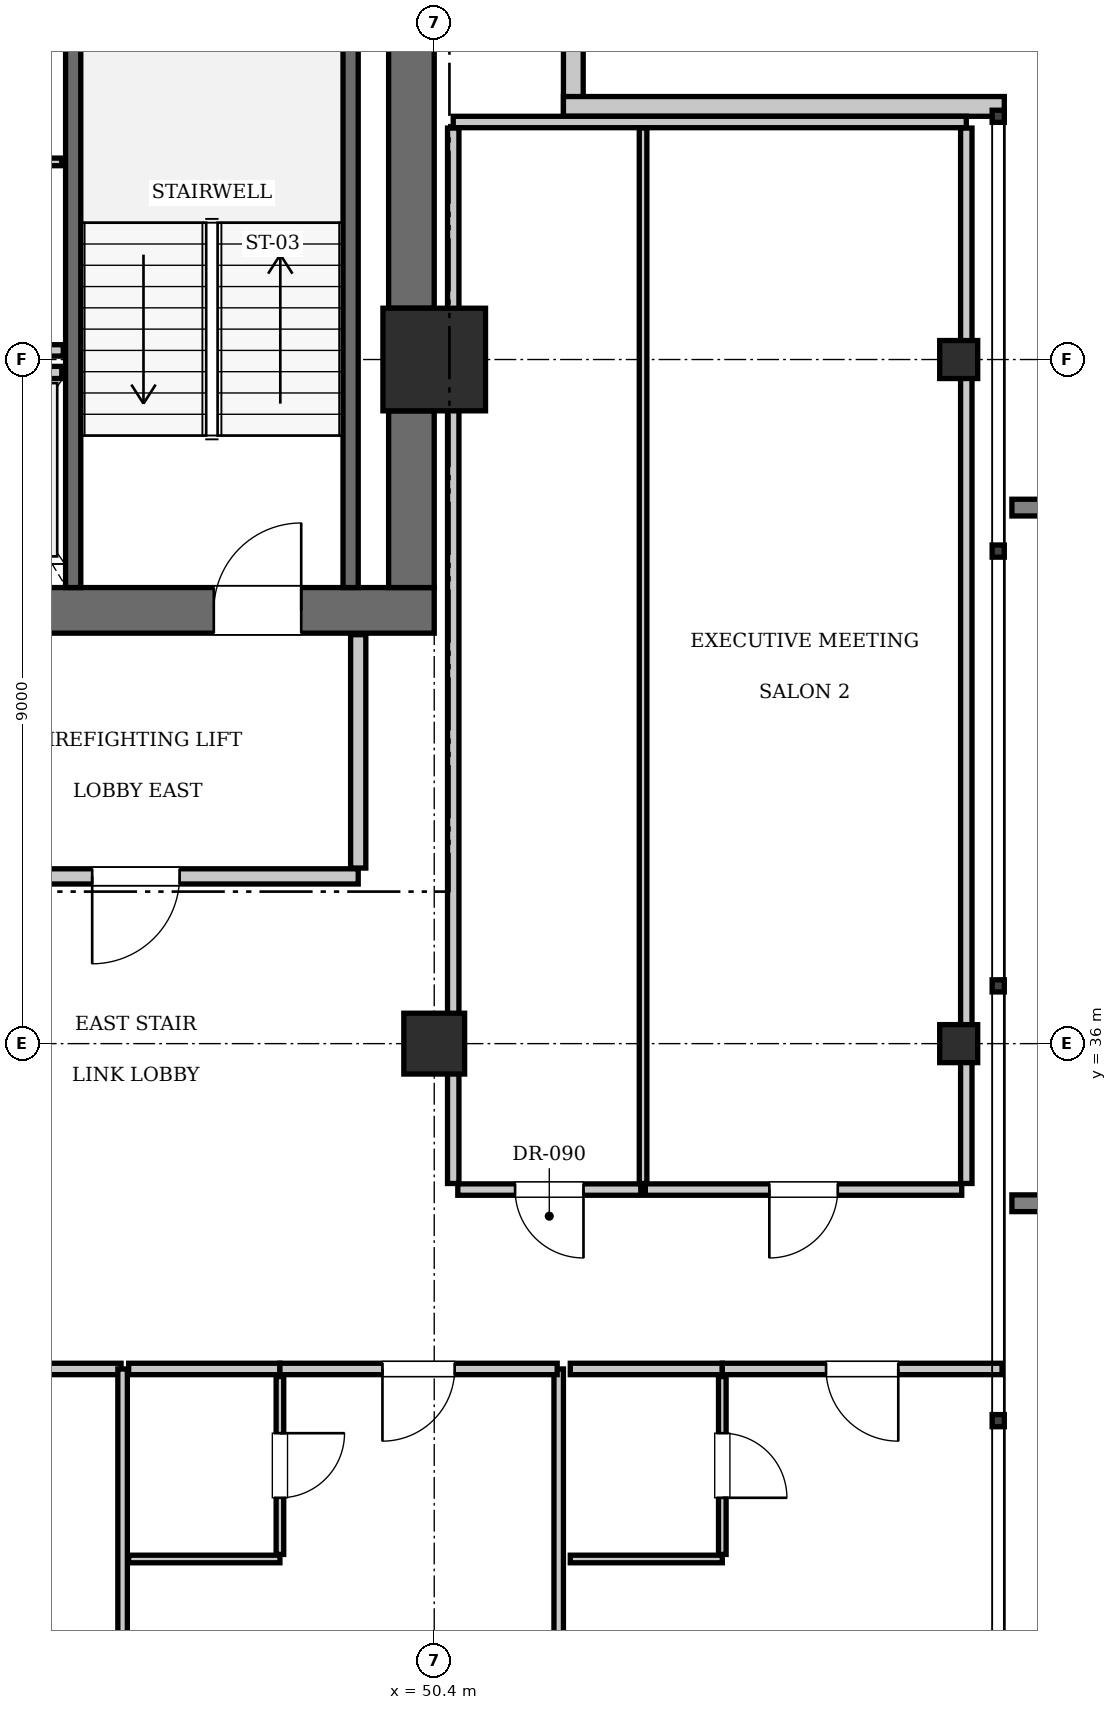
"""IFC4 building model, lengths in metres.
Left out: names, types, materials, properties, quantities, classifications, styles, units other than length and angle.
Written with IfcOpenShell. Run it as: python <this file> out.ifc"""

import sys

from ifc_helpers import new_model, si_unit, direction, frame, frame_2d, origin, origin_2d, place, context, subcontext, project, spatial, rectangle, i_section, extrude, element, fill, save


model = new_model("IFC4")
c1 = context("Model", 3, precision=1e-05, world=origin(), true_north=direction((0.0, 1.0)))
c2 = subcontext(c1, "Body", "Model", "MODEL_VIEW")
j1 = project(units=[si_unit("LENGTHUNIT", "METRE"), si_unit("PLANEANGLEUNIT", "RADIAN")], contexts=[c1])
p1 = place(None, origin())
s1 = spatial("IfcSite", under=j1, at=p1, CompositionType="ELEMENT")
p2 = place(p1, origin())
s2 = spatial("IfcBuilding", under=s1, at=p2, CompositionType="ELEMENT")
p3 = place(p2, frame((0.0, 0.0, 325.85)))
s3 = spatial("IfcBuildingStorey", under=s2, at=p3, CompositionType="ELEMENT", Elevation=325.85)
p4 = place(p3, frame((50.4, 45.0, 0.0), z_axis=(0.0, 0.0, 1.0), x_axis=(1.0, 0.0, 0.0)))
e1 = element("IfcColumn", 1, at=p4, inside=s3, PredefinedType="COLUMN", context=c2, shape_type="SweptSolid", body=[
    extrude(rectangle(XDim=1.35, YDim=1.35, at=origin_2d()), origin(), (0.0, 0.0, 1.0), 3.85),
])
p5 = place(p3, frame((43.6, 41.7, 0.0), z_axis=(0.0, 0.0, 1.0), x_axis=(1.0, 0.0, 0.0)))
e2 = element("IfcWall", 2, at=p5, inside=s3, PredefinedType="SHEAR", context=c2, shape_type="SweptSolid", body=[
    extrude(rectangle(XDim=6.8, YDim=0.6, at=frame_2d((3.4, 0.0))), origin(), (0.0, 0.0, 1.0), 3.85),
])
p6 = place(p5, frame((3.9, 0.0, 0.0)))
e3 = element("IfcOpeningElement", 3, at=p6, cuts=e2, PredefinedType="OPENING", context=c2, shape_type="SweptSolid", body=[
    extrude(rectangle(XDim=1.15, YDim=2.15, at=frame_2d((0.575, 1.075))), frame((0.0, 0.31, 0.0), z_axis=(0.0, -1.0, 0.0), x_axis=(1.0, 0.0, 0.0)), (0.0, 0.0, 1.0), 0.62),
])
p7 = place(p5, frame((0.55, 0.0, 0.0)))
e4 = element("IfcOpeningElement", 4, at=p7, cuts=e2, PredefinedType="OPENING", context=c2, shape_type="SweptSolid", body=[
    extrude(rectangle(XDim=1.1, YDim=2.2, at=frame_2d((0.55, 1.1))), frame((0.0, 0.31, 0.0), z_axis=(0.0, -1.0, 0.0), x_axis=(1.0, 0.0, 0.0)), (0.0, 0.0, 1.0), 0.62),
])
p8 = place(p3, frame((50.1, 42.0, 0.0), z_axis=(0.0, 0.0, 1.0), x_axis=(0.0, 1.0, 0.0)))
e5 = element("IfcWall", 5, at=p8, inside=s3, PredefinedType="SHEAR", context=c2, shape_type="SweptSolid", body=[
    extrude(rectangle(XDim=2.325, YDim=0.6, at=frame_2d((1.163, 0.0))), origin(), (0.0, 0.0, 1.0), 3.85),
])
p9 = place(p3, frame((50.1, 45.675, 0.0), z_axis=(0.0, 0.0, 1.0), x_axis=(0.0, 1.0, 0.0)))
e6 = element("IfcWall", 6, at=p9, inside=s3, PredefinedType="SHEAR", context=c2, shape_type="SweptSolid", body=[
    extrude(rectangle(XDim=7.725, YDim=0.6, at=frame_2d((3.862, 0.0))), origin(), (0.0, 0.0, 1.0), 3.85),
])
p10 = place(p3, frame((50.4, 36.0, 0.0), z_axis=(0.0, 0.0, 1.0), x_axis=(1.0, 0.0, 0.0)))
e7 = element("IfcColumn", 7, at=p10, inside=s3, PredefinedType="COLUMN", context=c2, shape_type="SweptSolid", body=[
    extrude(rectangle(XDim=0.8, YDim=0.8, at=origin_2d()), origin(), (0.0, 0.0, 1.0), 3.85),
])
for number, where, z_axis, x_axis in (
    (8, (57.3, 36.0, 0.0), (0.0, 0.0, 1.0), (1.0, 0.0, 0.0)),
    (9, (57.3, 45.0, 0.0), (0.0, 0.0, 1.0), (1.0, 0.0, 0.0)),
):
    element("IfcColumn", number, at=place(p3, frame(where, z_axis=z_axis, x_axis=x_axis)), inside=s3, PredefinedType="COLUMN", context=c2, shape_type="SweptSolid", body=[
        extrude(i_section(OverallWidth=0.5, OverallDepth=0.5, WebThickness=0.022, FlangeThickness=0.032, at=origin_2d()), origin(), (0.0, 0.0, 1.0), 3.85),
    ])
p11 = place(p3, frame((45.65, 42.0, 0.0), z_axis=(0.0, 0.0, 1.0), x_axis=(0.0, 1.0, 0.0)))
e10 = element("IfcWall", 10, at=p11, inside=s3, PredefinedType="SOLIDWALL", context=c2, shape_type="SweptSolid", body=[
    extrude(rectangle(XDim=9.15, YDim=0.2, at=frame_2d((4.575, 0.0))), origin(), (0.0, 0.0, 1.0), 3.61),
])
p12 = place(p3, frame((49.3, 42.0, 0.0), z_axis=(0.0, 0.0, 1.0), x_axis=(0.0, 1.0, 0.0)))
e11 = element("IfcWall", 11, at=p12, inside=s3, PredefinedType="SOLIDWALL", context=c2, shape_type="SweptSolid", body=[
    extrude(rectangle(XDim=9.12, YDim=0.2, at=frame_2d((4.56, 0.0))), origin(), (0.0, 0.0, 1.0), 3.61),
])
p13 = place(p3, frame((43.9, 44.83, 0.0), z_axis=(0.0, 0.0, 1.0), x_axis=(1.0, 0.0, 0.0)))
e12 = element("IfcWall", 12, at=p13, inside=s3, PredefinedType="SOLIDWALL", context=c2, shape_type="SweptSolid", body=[
    extrude(rectangle(XDim=1.6, YDim=0.16, at=frame_2d((0.8, 0.0))), origin(), (0.0, 0.0, 1.0), 3.61),
])
p14 = place(p3, frame((52.23, 54.0, 0.0), z_axis=(0.0, 0.0, 1.0), x_axis=(0.0, -1.0, 0.0)))
e13 = element("IfcWall", 13, at=p14, inside=s3, PredefinedType="SOLIDWALL", context=c2, shape_type="SweptSolid", body=[
    extrude(rectangle(XDim=5.8, YDim=0.26, at=frame_2d((2.9, 0.0))), origin(), (0.0, 0.0, 1.0), 3.61),
])
p15 = place(p3, frame((52.1, 48.33, 0.0), z_axis=(0.0, 0.0, 1.0), x_axis=(1.0, 0.0, 0.0)))
e14 = element("IfcWall", 14, at=p15, inside=s3, PredefinedType="SOLIDWALL", context=c2, shape_type="SweptSolid", body=[
    extrude(rectangle(XDim=5.8, YDim=0.26, at=frame_2d((2.9, 0.0))), origin(), (0.0, 0.0, 1.0), 3.61),
])
p16 = place(p3, frame((43.6, 38.2, 0.0), z_axis=(0.0, 0.0, 1.0), x_axis=(1.0, 0.0, 0.0)))
e15 = element("IfcWall", 15, at=p16, inside=s3, PredefinedType="PARTITIONING", context=c2, shape_type="SweptSolid", body=[
    extrude(rectangle(XDim=5.8, YDim=0.2, at=frame_2d((2.9, 0.0))), origin(), (0.0, 0.0, 1.0), 3.61),
])
p17 = place(p16, frame((2.3, 0.0, 0.0)))
e16 = element("IfcOpeningElement", 16, at=p17, cuts=e15, PredefinedType="OPENING", context=c2, shape_type="SweptSolid", body=[
    extrude(rectangle(XDim=1.15, YDim=2.15, at=frame_2d((0.575, 1.075))), frame((0.0, 0.11, 0.0), z_axis=(0.0, -1.0, 0.0), x_axis=(1.0, 0.0, 0.0)), (0.0, 0.0, 1.0), 0.22),
])
p18 = place(p3, frame((49.4, 38.31, 0.0), z_axis=(0.0, 0.0, 1.0), x_axis=(0.0, 1.0, 0.0)))
e17 = element("IfcWall", 17, at=p18, inside=s3, PredefinedType="PARTITIONING", context=c2, shape_type="SweptSolid", body=[
    extrude(rectangle(XDim=3.07, YDim=0.2, at=frame_2d((1.535, 0.0))), origin(), (0.0, 0.0, 1.0), 3.61),
])
p19 = place(p3, frame((42.4, 47.6, 0.0), z_axis=(0.0, 0.0, 1.0), x_axis=(1.0, 0.0, 0.0)))
e18 = element("IfcWall", 18, at=p19, inside=s3, PredefinedType="PARTITIONING", context=c2, shape_type="SweptSolid", body=[
    extrude(rectangle(XDim=3.1, YDim=0.1, at=frame_2d((1.55, 0.0))), origin(), (0.0, 0.0, 1.0), 3.61),
])
p20 = place(p3, frame((42.38, 45.12, 0.0), z_axis=(0.0, 0.0, 1.0), x_axis=(1.0, 0.0, 0.0)))
e19 = element("IfcWall", 19, at=p20, inside=s3, PredefinedType="PARTITIONING", context=c2, shape_type="SweptSolid", body=[
    extrude(rectangle(XDim=3.14, YDim=0.15, at=frame_2d((1.57, 0.0))), origin(), (0.0, 0.0, 1.0), 3.61),
])
p21 = place(p3, frame((50.65, 48.125, 0.0), z_axis=(0.0, 0.0, 1.0), x_axis=(1.0, 0.0, 0.0)))
e20 = element("IfcWall", 20, at=p21, inside=s3, PredefinedType="PARTITIONING", context=c2, shape_type="SweptSolid", body=[
    extrude(rectangle(XDim=6.75, YDim=0.15, at=frame_2d((3.375, 0.0))), origin(), (0.0, 0.0, 1.0), 3.61),
])
p22 = place(p3, frame((50.65, 34.16, 0.0), z_axis=(0.0, 0.0, 1.0), x_axis=(0.0, 1.0, 0.0)))
e21 = element("IfcWall", 21, at=p22, inside=s3, PredefinedType="PARTITIONING", context=c2, shape_type="SweptSolid", body=[
    extrude(rectangle(XDim=13.885, YDim=0.15, at=frame_2d((6.942, 0.0))), origin(), (0.0, 0.0, 1.0), 3.61),
])
p23 = place(p3, frame((57.4, 34.16, 0.0), z_axis=(0.0, 0.0, 1.0), x_axis=(0.0, 1.0, 0.0)))
e22 = element("IfcWall", 22, at=p23, inside=s3, PredefinedType="PARTITIONING", context=c2, shape_type="SweptSolid", body=[
    extrude(rectangle(XDim=13.885, YDim=0.15, at=frame_2d((6.942, 0.0))), origin(), (0.0, 0.0, 1.0), 3.141),
])
p24 = place(p3, frame((50.71, 34.08, 0.0), z_axis=(0.0, 0.0, 1.0), x_axis=(1.0, 0.0, 0.0)))
e23 = element("IfcWall", 23, at=p24, inside=s3, PredefinedType="PARTITIONING", context=c2, shape_type="SweptSolid", body=[
    extrude(rectangle(XDim=2.407, YDim=0.15, at=frame_2d((1.204, 0.0))), origin(), (0.0, 0.0, 1.0), 3.61),
])
p25 = place(p24, frame((0.754, 0.0, 0.0)))
e24 = element("IfcOpeningElement", 24, at=p25, cuts=e23, PredefinedType="OPENING", context=c2, shape_type="SweptSolid", body=[
    extrude(rectangle(XDim=0.9, YDim=2.1, at=frame_2d((0.45, 1.05))), frame((0.0, 0.085, 0.0), z_axis=(0.0, -1.0, 0.0), x_axis=(1.0, 0.0, 0.0)), (0.0, 0.0, 1.0), 0.17),
])
p26 = place(p3, frame((53.147, 34.16, 0.0), z_axis=(0.0, 0.0, 1.0), x_axis=(0.0, 1.0, 0.0)))
e25 = element("IfcWall", 25, at=p26, inside=s3, PredefinedType="PARTITIONING", context=c2, shape_type="SweptSolid", body=[
    extrude(rectangle(XDim=13.885, YDim=0.1, at=frame_2d((6.942, 0.0))), origin(), (0.0, 0.0, 1.0), 3.61),
])
p27 = place(p3, frame((53.177, 34.08, 0.0), z_axis=(0.0, 0.0, 1.0), x_axis=(1.0, 0.0, 0.0)))
e26 = element("IfcWall", 26, at=p27, inside=s3, PredefinedType="PARTITIONING", context=c2, shape_type="SweptSolid", body=[
    extrude(rectangle(XDim=4.163, YDim=0.15, at=frame_2d((2.081, 0.0))), origin(), (0.0, 0.0, 1.0), 3.61),
])
p28 = place(p27, frame((1.631, 0.0, 0.0)))
e27 = element("IfcOpeningElement", 27, at=p28, cuts=e26, PredefinedType="OPENING", context=c2, shape_type="SweptSolid", body=[
    extrude(rectangle(XDim=0.9, YDim=2.1, at=frame_2d((0.45, 1.05))), frame((0.0, 0.085, 0.0), z_axis=(0.0, -1.0, 0.0), x_axis=(1.0, 0.0, 0.0)), (0.0, 0.0, 1.0), 0.17),
])
p29 = place(p3, frame((52.038, 19.34, 0.0), z_axis=(0.0, 0.0, 1.0), x_axis=(0.0, 1.0, 0.0)))
e28 = element("IfcWall", 28, at=p29, inside=s3, PredefinedType="PARTITIONING", context=c2, shape_type="SweptSolid", body=[
    extrude(rectangle(XDim=12.38, YDim=0.125, at=frame_2d((6.19, 0.0))), origin(), (0.0, 0.0, 1.0), 3.61),
])
p30 = place(p3, frame((42.65, 31.72, 0.0), z_axis=(0.0, 0.0, 1.0), x_axis=(1.0, 0.0, 0.0)))
e29 = element("IfcWall", 29, at=p30, inside=s3, PredefinedType="PARTITIONING", context=c2, shape_type="SweptSolid", body=[
    extrude(rectangle(XDim=3.63, YDim=0.15, at=frame_2d((1.815, 0.0))), origin(), (0.0, 0.0, 1.0), 3.61),
])
p31 = place(p30, frame((1.34, 0.0, 0.0)))
e30 = element("IfcOpeningElement", 30, at=p31, cuts=e29, PredefinedType="OPENING", context=c2, shape_type="SweptSolid", body=[
    extrude(rectangle(XDim=0.95, YDim=2.15, at=frame_2d((0.475, 1.075))), frame((0.0, 0.085, 0.0), z_axis=(0.0, -1.0, 0.0), x_axis=(1.0, 0.0, 0.0)), (0.0, 0.0, 1.0), 0.17),
])
p32 = place(p3, frame((46.3, 13.9, 0.0), z_axis=(0.0, 0.0, 1.0), x_axis=(0.0, 1.0, 0.0)))
e31 = element("IfcWall", 31, at=p32, inside=s3, PredefinedType="PARTITIONING", context=c2, shape_type="SweptSolid", body=[
    extrude(rectangle(XDim=17.82, YDim=0.125, at=frame_2d((8.91, 0.0))), origin(), (0.0, 0.0, 1.0), 3.344),
])
p33 = place(p3, frame((46.38, 31.72, 0.0), z_axis=(0.0, 0.0, 1.0), x_axis=(1.0, 0.0, 0.0)))
e32 = element("IfcWall", 32, at=p33, inside=s3, PredefinedType="PARTITIONING", context=c2, shape_type="SweptSolid", body=[
    extrude(rectangle(XDim=1.99, YDim=0.15, at=frame_2d((0.995, 0.0))), origin(), (0.0, 0.0, 1.0), 3.61),
])
p34 = place(p3, frame((46.38, 29.22, 0.0), z_axis=(0.0, 0.0, 1.0), x_axis=(1.0, 0.0, 0.0)))
e33 = element("IfcWall", 33, at=p34, inside=s3, PredefinedType="PARTITIONING", context=c2, shape_type="SweptSolid", body=[
    extrude(rectangle(XDim=1.99, YDim=0.1, at=frame_2d((0.995, 0.0))), origin(), (0.0, 0.0, 1.0), 3.61),
])
p35 = place(p3, frame((48.37, 29.28, 0.0), z_axis=(0.0, 0.0, 1.0), x_axis=(0.0, 1.0, 0.0)))
e34 = element("IfcWall", 34, at=p35, inside=s3, PredefinedType="PARTITIONING", context=c2, shape_type="SweptSolid", body=[
    extrude(rectangle(XDim=2.34, YDim=0.1, at=frame_2d((1.17, 0.0))), origin(), (0.0, 0.0, 1.0), 3.61),
])
p36 = place(p35, frame((0.745, 0.0, 0.0)))
e35 = element("IfcOpeningElement", 35, at=p36, cuts=e34, PredefinedType="OPENING", context=c2, shape_type="SweptSolid", body=[
    extrude(rectangle(XDim=0.85, YDim=2.1, at=frame_2d((0.425, 1.05))), frame((0.0, 0.06, 0.0), z_axis=(0.0, -1.0, 0.0), x_axis=(1.0, 0.0, 0.0)), (0.0, 0.0, 1.0), 0.12),
])
p37 = place(p3, frame((48.37, 31.72, 0.0), z_axis=(0.0, 0.0, 1.0), x_axis=(1.0, 0.0, 0.0)))
e36 = element("IfcWall", 36, at=p37, inside=s3, PredefinedType="PARTITIONING", context=c2, shape_type="SweptSolid", body=[
    extrude(rectangle(XDim=3.647, YDim=0.15, at=frame_2d((1.824, 0.0))), origin(), (0.0, 0.0, 1.0), 3.61),
])
p38 = place(p37, frame((1.349, 0.0, 0.0)))
e37 = element("IfcOpeningElement", 37, at=p38, cuts=e36, PredefinedType="OPENING", context=c2, shape_type="SweptSolid", body=[
    extrude(rectangle(XDim=0.95, YDim=2.15, at=frame_2d((0.475, 1.075))), frame((0.0, 0.085, 0.0), z_axis=(0.0, -1.0, 0.0), x_axis=(1.0, 0.0, 0.0)), (0.0, 0.0, 1.0), 0.17),
])
p39 = place(p3, frame((52.19, 31.72, 0.0), z_axis=(0.0, 0.0, 1.0), x_axis=(1.0, 0.0, 0.0)))
e38 = element("IfcWall", 38, at=p39, inside=s3, PredefinedType="PARTITIONING", context=c2, shape_type="SweptSolid", body=[
    extrude(rectangle(XDim=2.0, YDim=0.15, at=frame_2d((1.0, 0.0))), origin(), (0.0, 0.0, 1.0), 3.61),
])
p40 = place(p3, frame((52.19, 29.22, 0.0), z_axis=(0.0, 0.0, 1.0), x_axis=(1.0, 0.0, 0.0)))
e39 = element("IfcWall", 39, at=p40, inside=s3, PredefinedType="PARTITIONING", context=c2, shape_type="SweptSolid", body=[
    extrude(rectangle(XDim=2.0, YDim=0.1, at=frame_2d((1.0, 0.0))), origin(), (0.0, 0.0, 1.0), 3.61),
])
p41 = place(p3, frame((54.19, 29.28, 0.0), z_axis=(0.0, 0.0, 1.0), x_axis=(0.0, 1.0, 0.0)))
e40 = element("IfcWall", 40, at=p41, inside=s3, PredefinedType="PARTITIONING", context=c2, shape_type="SweptSolid", body=[
    extrude(rectangle(XDim=2.34, YDim=0.1, at=frame_2d((1.17, 0.0))), origin(), (0.0, 0.0, 1.0), 3.61),
])
p42 = place(p41, frame((0.745, 0.0, 0.0)))
e41 = element("IfcOpeningElement", 41, at=p42, cuts=e40, PredefinedType="OPENING", context=c2, shape_type="SweptSolid", body=[
    extrude(rectangle(XDim=0.85, YDim=2.1, at=frame_2d((0.425, 1.05))), frame((0.0, 0.06, 0.0), z_axis=(0.0, -1.0, 0.0), x_axis=(1.0, 0.0, 0.0)), (0.0, 0.0, 1.0), 0.12),
])
p43 = place(p3, frame((54.19, 31.72, 0.0), z_axis=(0.0, 0.0, 1.0), x_axis=(1.0, 0.0, 0.0)))
e42 = element("IfcWall", 42, at=p43, inside=s3, PredefinedType="PARTITIONING", context=c2, shape_type="SweptSolid", body=[
    extrude(rectangle(XDim=3.68, YDim=0.15, at=frame_2d((1.84, 0.0))), origin(), (0.0, 0.0, 1.0), 3.61),
])
p44 = place(p43, frame((1.365, 0.0, 0.0)))
e43 = element("IfcOpeningElement", 43, at=p44, cuts=e42, PredefinedType="OPENING", context=c2, shape_type="SweptSolid", body=[
    extrude(rectangle(XDim=0.95, YDim=2.15, at=frame_2d((0.475, 1.075))), frame((0.0, 0.085, 0.0), z_axis=(0.0, -1.0, 0.0), x_axis=(1.0, 0.0, 0.0)), (0.0, 0.0, 1.0), 0.17),
])
p45 = place(p6, origin())
e44 = element("IfcDoor", 44, at=p45, inside=s3, OperationType="SINGLE_SWING_RIGHT", PredefinedType="DOOR", context=c2, shape_type="SweptSolid", body=[
    extrude(rectangle(XDim=1.15, YDim=2.15, at=frame_2d((0.575, 1.075))), frame((0.0, 0.025, 0.0), z_axis=(0.0, -1.0, 0.0), x_axis=(1.0, 0.0, 0.0)), (0.0, 0.0, 1.0), 0.05),
])
fill(e3, e44)
p46 = place(p17, frame((1.15, 0.0, 0.0), z_axis=(0.0, 0.0, 1.0), x_axis=(-1.0, 0.0, 0.0)))
e45 = element("IfcDoor", 45, at=p46, inside=s3, OperationType="SINGLE_SWING_RIGHT", PredefinedType="DOOR", context=c2, shape_type="SweptSolid", body=[
    extrude(rectangle(XDim=1.15, YDim=2.15, at=frame_2d((0.575, 1.075))), frame((0.0, 0.025, 0.0), z_axis=(0.0, -1.0, 0.0), x_axis=(1.0, 0.0, 0.0)), (0.0, 0.0, 1.0), 0.05),
])
fill(e16, e45)
p47 = place(p25, frame((0.9, 0.0, 0.0), z_axis=(0.0, 0.0, 1.0), x_axis=(-1.0, 0.0, 0.0)))
e46 = element("IfcDoor", 46, at=p47, inside=s3, OperationType="SINGLE_SWING_LEFT", PredefinedType="DOOR", context=c2, shape_type="SweptSolid", body=[
    extrude(rectangle(XDim=0.9, YDim=2.1, at=frame_2d((0.45, 1.05))), frame((0.0, 0.025, 0.0), z_axis=(0.0, -1.0, 0.0), x_axis=(1.0, 0.0, 0.0)), (0.0, 0.0, 1.0), 0.05),
])
fill(e24, e46)
p48 = place(p28, frame((0.9, 0.0, 0.0), z_axis=(0.0, 0.0, 1.0), x_axis=(-1.0, 0.0, 0.0)))
e47 = element("IfcDoor", 47, at=p48, inside=s3, OperationType="SINGLE_SWING_RIGHT", PredefinedType="DOOR", context=c2, shape_type="SweptSolid", body=[
    extrude(rectangle(XDim=0.9, YDim=2.1, at=frame_2d((0.45, 1.05))), frame((0.0, 0.025, 0.0), z_axis=(0.0, -1.0, 0.0), x_axis=(1.0, 0.0, 0.0)), (0.0, 0.0, 1.0), 0.05),
])
fill(e27, e47)
p49 = place(p36, frame((0.85, 0.0, 0.0), z_axis=(0.0, 0.0, 1.0), x_axis=(-1.0, 0.0, 0.0)))
e48 = element("IfcDoor", 48, at=p49, inside=s3, OperationType="SINGLE_SWING_LEFT", PredefinedType="DOOR", context=c2, shape_type="SweptSolid", body=[
    extrude(rectangle(XDim=0.85, YDim=2.1, at=frame_2d((0.425, 1.05))), frame((0.0, 0.025, 0.0), z_axis=(0.0, -1.0, 0.0), x_axis=(1.0, 0.0, 0.0)), (0.0, 0.0, 1.0), 0.05),
])
fill(e35, e48)
p50 = place(p38, frame((0.95, 0.0, 0.0), z_axis=(0.0, 0.0, 1.0), x_axis=(-1.0, 0.0, 0.0)))
e49 = element("IfcDoor", 49, at=p50, inside=s3, OperationType="SINGLE_SWING_RIGHT", PredefinedType="DOOR", context=c2, shape_type="SweptSolid", body=[
    extrude(rectangle(XDim=0.95, YDim=2.15, at=frame_2d((0.475, 1.075))), frame((0.0, 0.025, 0.0), z_axis=(0.0, -1.0, 0.0), x_axis=(1.0, 0.0, 0.0)), (0.0, 0.0, 1.0), 0.05),
])
fill(e37, e49)
p51 = place(p42, frame((0.85, 0.0, 0.0), z_axis=(0.0, 0.0, 1.0), x_axis=(-1.0, 0.0, 0.0)))
e50 = element("IfcDoor", 50, at=p51, inside=s3, OperationType="SINGLE_SWING_RIGHT", PredefinedType="DOOR", context=c2, shape_type="SweptSolid", body=[
    extrude(rectangle(XDim=0.85, YDim=2.1, at=frame_2d((0.425, 1.05))), frame((0.0, 0.025, 0.0), z_axis=(0.0, -1.0, 0.0), x_axis=(1.0, 0.0, 0.0)), (0.0, 0.0, 1.0), 0.05),
])
fill(e41, e50)
p52 = place(p44, frame((0.95, 0.0, 0.0), z_axis=(0.0, 0.0, 1.0), x_axis=(-1.0, 0.0, 0.0)))
e51 = element("IfcDoor", 51, at=p52, inside=s3, OperationType="SINGLE_SWING_LEFT", PredefinedType="DOOR", context=c2, shape_type="SweptSolid", body=[
    extrude(rectangle(XDim=0.95, YDim=2.15, at=frame_2d((0.475, 1.075))), frame((0.0, 0.025, 0.0), z_axis=(0.0, -1.0, 0.0), x_axis=(1.0, 0.0, 0.0)), (0.0, 0.0, 1.0), 0.05),
])
fill(e43, e51)
save(model, sys.argv[1])
